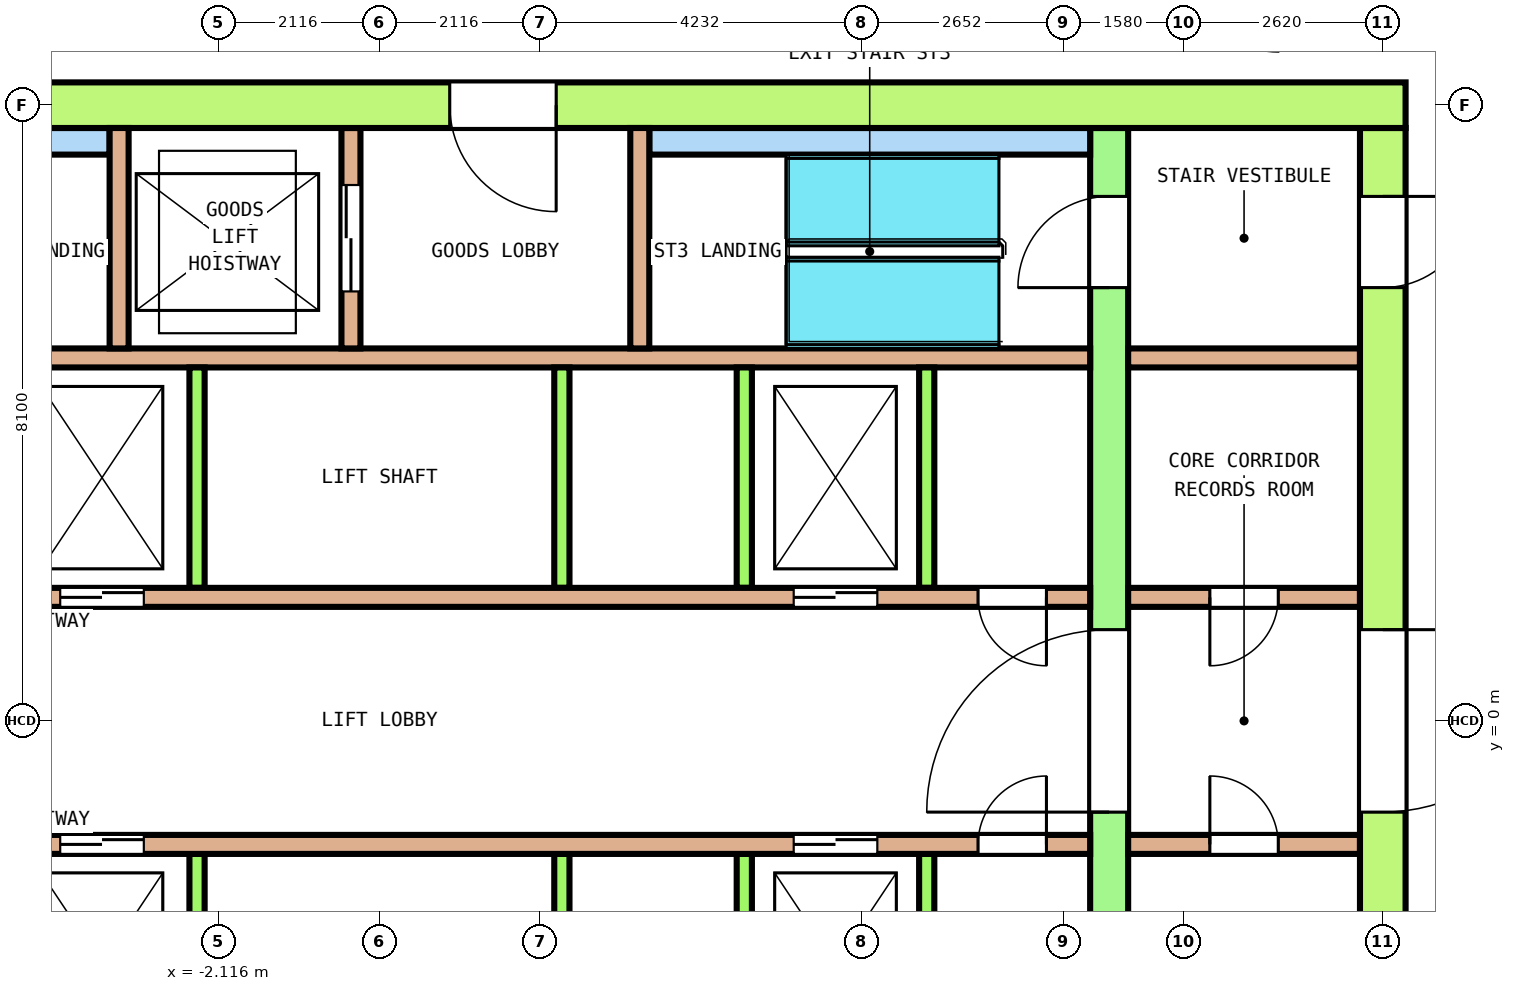
"""IFC4 building model, lengths in metres.
Left out: names, types, materials, properties, quantities, classifications, styles, units other than length and angle.
Written with IfcOpenShell. Run it as: python <this file> out.ifc"""

import sys

from ifc_helpers import new_model, si_unit, direction, frame, frame_2d, origin, place, context, subcontext, project, spatial, rectangle, extrude, element, fill, save


model = new_model("IFC4")
c1 = context("Model", 3, precision=1e-05, world=origin(), true_north=direction((0.0, 1.0)))
c2 = subcontext(c1, "Body", "Model", "MODEL_VIEW")
j1 = project(units=[si_unit("LENGTHUNIT", "METRE"), si_unit("PLANEANGLEUNIT", "RADIAN")], contexts=[c1])
p1 = place(None, origin())
s1 = spatial("IfcSite", under=j1, at=p1, CompositionType="ELEMENT")
p2 = place(p1, origin())
s2 = spatial("IfcBuilding", under=s1, at=p2, CompositionType="ELEMENT")
p3 = place(p2, frame((0.0, 0.0, 227.4)))
s3 = spatial("IfcBuildingStorey", under=s2, at=p3, CompositionType="ELEMENT", Elevation=227.4)
p4 = place(p3, frame((-13.5, 8.1, 0.0), z_axis=(0.0, 0.0, 1.0), x_axis=(1.0, 0.0, 0.0)))
e1 = element("IfcWall", 1, at=p4, inside=s3, PredefinedType="SHEAR", context=c2, shape_type="SweptSolid", body=[
    extrude(rectangle(XDim=27.0, YDim=0.6, at=frame_2d((13.5, 0.0))), origin(), (0.0, 0.0, 1.0), 3.7),
])
p5 = place(p4, frame((14.425, 0.0, 0.0)))
e2 = element("IfcOpeningElement", 2, at=p5, cuts=e1, PredefinedType="OPENING", context=c2, shape_type="SweptSolid", body=[
    extrude(rectangle(XDim=1.4, YDim=2.1, at=frame_2d((0.7, 1.05))), frame((0.0, 0.31, 0.0), z_axis=(0.0, -1.0, 0.0), x_axis=(1.0, 0.0, 0.0)), (0.0, 0.0, 1.0), 0.62),
])
p6 = place(p3, frame((13.2, -7.8, 0.0), z_axis=(0.0, 0.0, 1.0), x_axis=(0.0, 1.0, 0.0)))
e3 = element("IfcWall", 3, at=p6, inside=s3, PredefinedType="SHEAR", context=c2, shape_type="SweptSolid", body=[
    extrude(rectangle(XDim=15.6, YDim=0.6, at=frame_2d((7.8, 0.0))), origin(), (0.0, 0.0, 1.0), 3.7),
])
p7 = place(p6, frame((6.6, 0.0, 0.0)))
e4 = element("IfcOpeningElement", 4, at=p7, cuts=e3, PredefinedType="OPENING", context=c2, shape_type="SweptSolid", body=[
    extrude(rectangle(XDim=2.4, YDim=2.1, at=frame_2d((1.2, 1.05))), frame((0.0, 0.31, 0.0), z_axis=(0.0, -1.0, 0.0), x_axis=(1.0, 0.0, 0.0)), (0.0, 0.0, 1.0), 0.62),
])
p8 = place(p6, frame((13.5, 0.0, 0.0)))
e5 = element("IfcOpeningElement", 5, at=p8, cuts=e3, PredefinedType="OPENING", context=c2, shape_type="SweptSolid", body=[
    extrude(rectangle(XDim=1.2, YDim=2.1, at=frame_2d((0.6, 1.05))), frame((0.0, 0.31, 0.0), z_axis=(0.0, -1.0, 0.0), x_axis=(1.0, 0.0, 0.0)), (0.0, 0.0, 1.0), 0.62),
])
p9 = place(p6, frame((0.194, 0.0, 0.0)))
e6 = element("IfcOpeningElement", 6, at=p9, cuts=e3, PredefinedType="OPENING", context=c2, shape_type="SweptSolid", body=[
    extrude(rectangle(XDim=1.0, YDim=2.1, at=frame_2d((0.5, 1.05))), frame((0.0, 0.31, 0.0), z_axis=(0.0, -1.0, 0.0), x_axis=(1.0, 0.0, 0.0)), (0.0, 0.0, 1.0), 0.62),
])
p10 = place(p6, frame((1.706, 0.0, 0.0)))
e7 = element("IfcOpeningElement", 7, at=p10, cuts=e3, PredefinedType="OPENING", context=c2, shape_type="SweptSolid", body=[
    extrude(rectangle(XDim=1.0, YDim=2.1, at=frame_2d((0.5, 1.05))), frame((0.0, 0.31, 0.0), z_axis=(0.0, -1.0, 0.0), x_axis=(1.0, 0.0, 0.0)), (0.0, 0.0, 1.0), 0.62),
])
p11 = place(p3, frame((9.6, -7.8, 0.0), z_axis=(0.0, 0.0, 1.0), x_axis=(0.0, 1.0, 0.0)))
e8 = element("IfcWall", 8, at=p11, inside=s3, PredefinedType="SHEAR", context=c2, shape_type="SweptSolid", body=[
    extrude(rectangle(XDim=15.6, YDim=0.5, at=frame_2d((7.8, 0.0))), origin(), (0.0, 0.0, 1.0), 3.7),
])
p12 = place(p11, frame((6.6, 0.0, 0.0)))
e9 = element("IfcOpeningElement", 9, at=p12, cuts=e8, PredefinedType="OPENING", context=c2, shape_type="SweptSolid", body=[
    extrude(rectangle(XDim=2.4, YDim=2.1, at=frame_2d((1.2, 1.05))), frame((0.0, 0.26, 0.0), z_axis=(0.0, -1.0, 0.0), x_axis=(1.0, 0.0, 0.0)), (0.0, 0.0, 1.0), 0.52),
])
p13 = place(p11, frame((13.5, 0.0, 0.0)))
e10 = element("IfcOpeningElement", 10, at=p13, cuts=e8, PredefinedType="OPENING", context=c2, shape_type="SweptSolid", body=[
    extrude(rectangle(XDim=1.2, YDim=2.1, at=frame_2d((0.6, 1.05))), frame((0.0, 0.26, 0.0), z_axis=(0.0, -1.0, 0.0), x_axis=(1.0, 0.0, 0.0)), (0.0, 0.0, 1.0), 0.52),
])
p14 = place(p11, frame((1.0, 0.0, 0.0)))
e11 = element("IfcOpeningElement", 11, at=p14, cuts=e8, PredefinedType="OPENING", context=c2, shape_type="SweptSolid", body=[
    extrude(rectangle(XDim=1.0, YDim=2.1, at=frame_2d((0.5, 1.05))), frame((0.0, 0.26, 0.0), z_axis=(0.0, -1.0, 0.0), x_axis=(1.0, 0.0, 0.0)), (0.0, 0.0, 1.0), 0.52),
])
p15 = place(p3, frame((-9.35, 1.625, 0.0), z_axis=(0.0, 0.0, 1.0), x_axis=(1.0, 0.0, 0.0)))
e12 = element("IfcWall", 12, at=p15, inside=s3, PredefinedType="SOLIDWALL", context=c2, shape_type="SweptSolid", body=[
    extrude(rectangle(XDim=18.7, YDim=0.25, at=frame_2d((9.35, 0.0))), origin(), (0.0, 0.0, 1.0), 3.7),
])
p16 = place(p15, frame((2.85, 0.0, 0.0)))
e13 = element("IfcOpeningElement", 13, at=p16, cuts=e12, PredefinedType="OPENING", context=c2, shape_type="SweptSolid", body=[
    extrude(rectangle(XDim=1.1, YDim=2.1, at=frame_2d((0.55, 1.05))), frame((0.0, 0.135, 0.0), z_axis=(0.0, -1.0, 0.0), x_axis=(1.0, 0.0, 0.0)), (0.0, 0.0, 1.0), 0.27),
])
p17 = place(p15, frame((5.15, 0.0, 0.0)))
e14 = element("IfcOpeningElement", 14, at=p17, cuts=e12, PredefinedType="OPENING", context=c2, shape_type="SweptSolid", body=[
    extrude(rectangle(XDim=1.1, YDim=2.1, at=frame_2d((0.55, 1.05))), frame((0.0, 0.135, 0.0), z_axis=(0.0, -1.0, 0.0), x_axis=(1.0, 0.0, 0.0)), (0.0, 0.0, 1.0), 0.27),
])
p18 = place(p15, frame((14.8, 0.0, 0.0)))
e15 = element("IfcOpeningElement", 15, at=p18, cuts=e12, PredefinedType="OPENING", context=c2, shape_type="SweptSolid", body=[
    extrude(rectangle(XDim=1.1, YDim=2.1, at=frame_2d((0.55, 1.05))), frame((0.0, 0.135, 0.0), z_axis=(0.0, -1.0, 0.0), x_axis=(1.0, 0.0, 0.0)), (0.0, 0.0, 1.0), 0.27),
])
p19 = place(p15, frame((0.575, 0.0, 0.0)))
e16 = element("IfcOpeningElement", 16, at=p19, cuts=e12, PredefinedType="OPENING", context=c2, shape_type="SweptSolid", body=[
    extrude(rectangle(XDim=0.9, YDim=2.1, at=frame_2d((0.45, 1.05))), frame((0.0, 0.135, 0.0), z_axis=(0.0, -1.0, 0.0), x_axis=(1.0, 0.0, 0.0)), (0.0, 0.0, 1.0), 0.27),
])
p20 = place(p15, frame((17.225, 0.0, 0.0)))
e17 = element("IfcOpeningElement", 17, at=p20, cuts=e12, PredefinedType="OPENING", context=c2, shape_type="SweptSolid", body=[
    extrude(rectangle(XDim=0.9, YDim=2.1, at=frame_2d((0.45, 1.05))), frame((0.0, 0.135, 0.0), z_axis=(0.0, -1.0, 0.0), x_axis=(1.0, 0.0, 0.0)), (0.0, 0.0, 1.0), 0.27),
])
p21 = place(p3, frame((9.85, 1.625, 0.0), z_axis=(0.0, 0.0, 1.0), x_axis=(1.0, 0.0, 0.0)))
e18 = element("IfcWall", 18, at=p21, inside=s3, PredefinedType="SOLIDWALL", context=c2, shape_type="SweptSolid", body=[
    extrude(rectangle(XDim=3.05, YDim=0.25, at=frame_2d((1.525, 0.0))), origin(), (0.0, 0.0, 1.0), 3.7),
])
p22 = place(p21, frame((1.075, 0.0, 0.0)))
e19 = element("IfcOpeningElement", 19, at=p22, cuts=e18, PredefinedType="OPENING", context=c2, shape_type="SweptSolid", body=[
    extrude(rectangle(XDim=0.9, YDim=2.1, at=frame_2d((0.45, 1.05))), frame((0.0, 0.135, 0.0), z_axis=(0.0, -1.0, 0.0), x_axis=(1.0, 0.0, 0.0)), (0.0, 0.0, 1.0), 0.27),
])
p23 = place(p3, frame((-9.35, 4.775, 0.0), z_axis=(0.0, 0.0, 1.0), x_axis=(1.0, 0.0, 0.0)))
e20 = element("IfcWall", 20, at=p23, inside=s3, PredefinedType="SOLIDWALL", context=c2, shape_type="SweptSolid", body=[
    extrude(rectangle(XDim=18.7, YDim=0.25, at=frame_2d((9.35, 0.0))), origin(), (0.0, 0.0, 1.0), 3.7),
])
p24 = place(p3, frame((9.85, 4.775, 0.0), z_axis=(0.0, 0.0, 1.0), x_axis=(1.0, 0.0, 0.0)))
e21 = element("IfcWall", 21, at=p24, inside=s3, PredefinedType="SOLIDWALL", context=c2, shape_type="SweptSolid", body=[
    extrude(rectangle(XDim=3.05, YDim=0.25, at=frame_2d((1.525, 0.0))), origin(), (0.0, 0.0, 1.0), 3.7),
])
for number, where, z_axis, x_axis in (
    (22, (-2.4, 1.75, 0.0), (0.0, 0.0, 1.0), (0.0, 1.0, 0.0)),
    (23, (2.4, 1.75, 0.0), (0.0, 0.0, 1.0), (0.0, 1.0, 0.0)),
    (24, (4.8, 1.75, 0.0), (0.0, 0.0, 1.0), (0.0, 1.0, 0.0)),
    (25, (7.2, 1.75, 0.0), (0.0, 0.0, 1.0), (0.0, 1.0, 0.0)),
):
    element("IfcWall", number, at=place(p3, frame(where, z_axis=z_axis, x_axis=x_axis)), inside=s3, PredefinedType="SOLIDWALL", context=c2, shape_type="SweptSolid", body=[
        extrude(rectangle(XDim=2.9, YDim=0.2, at=frame_2d((1.45, 0.0))), origin(), (0.0, 0.0, 1.0), 3.7),
    ])
p25 = place(p3, frame((-9.35, -1.625, 0.0), z_axis=(0.0, 0.0, 1.0), x_axis=(1.0, 0.0, 0.0)))
e26 = element("IfcWall", 26, at=p25, inside=s3, PredefinedType="SOLIDWALL", context=c2, shape_type="SweptSolid", body=[
    extrude(rectangle(XDim=18.7, YDim=0.25, at=frame_2d((9.35, 0.0))), origin(), (0.0, 0.0, 1.0), 3.7),
])
p26 = place(p25, frame((2.85, 0.0, 0.0)))
e27 = element("IfcOpeningElement", 27, at=p26, cuts=e26, PredefinedType="OPENING", context=c2, shape_type="SweptSolid", body=[
    extrude(rectangle(XDim=1.1, YDim=2.1, at=frame_2d((0.55, 1.05))), frame((0.0, 0.135, 0.0), z_axis=(0.0, -1.0, 0.0), x_axis=(1.0, 0.0, 0.0)), (0.0, 0.0, 1.0), 0.27),
])
p27 = place(p25, frame((5.15, 0.0, 0.0)))
e28 = element("IfcOpeningElement", 28, at=p27, cuts=e26, PredefinedType="OPENING", context=c2, shape_type="SweptSolid", body=[
    extrude(rectangle(XDim=1.1, YDim=2.1, at=frame_2d((0.55, 1.05))), frame((0.0, 0.135, 0.0), z_axis=(0.0, -1.0, 0.0), x_axis=(1.0, 0.0, 0.0)), (0.0, 0.0, 1.0), 0.27),
])
p28 = place(p25, frame((14.8, 0.0, 0.0)))
e29 = element("IfcOpeningElement", 29, at=p28, cuts=e26, PredefinedType="OPENING", context=c2, shape_type="SweptSolid", body=[
    extrude(rectangle(XDim=1.1, YDim=2.1, at=frame_2d((0.55, 1.05))), frame((0.0, 0.135, 0.0), z_axis=(0.0, -1.0, 0.0), x_axis=(1.0, 0.0, 0.0)), (0.0, 0.0, 1.0), 0.27),
])
p29 = place(p25, frame((0.575, 0.0, 0.0)))
e30 = element("IfcOpeningElement", 30, at=p29, cuts=e26, PredefinedType="OPENING", context=c2, shape_type="SweptSolid", body=[
    extrude(rectangle(XDim=0.9, YDim=2.1, at=frame_2d((0.45, 1.05))), frame((0.0, 0.135, 0.0), z_axis=(0.0, -1.0, 0.0), x_axis=(1.0, 0.0, 0.0)), (0.0, 0.0, 1.0), 0.27),
])
p30 = place(p25, frame((17.225, 0.0, 0.0)))
e31 = element("IfcOpeningElement", 31, at=p30, cuts=e26, PredefinedType="OPENING", context=c2, shape_type="SweptSolid", body=[
    extrude(rectangle(XDim=0.9, YDim=2.1, at=frame_2d((0.45, 1.05))), frame((0.0, 0.135, 0.0), z_axis=(0.0, -1.0, 0.0), x_axis=(1.0, 0.0, 0.0)), (0.0, 0.0, 1.0), 0.27),
])
p31 = place(p3, frame((9.85, -1.625, 0.0), z_axis=(0.0, 0.0, 1.0), x_axis=(1.0, 0.0, 0.0)))
e32 = element("IfcWall", 32, at=p31, inside=s3, PredefinedType="SOLIDWALL", context=c2, shape_type="SweptSolid", body=[
    extrude(rectangle(XDim=3.05, YDim=0.25, at=frame_2d((1.525, 0.0))), origin(), (0.0, 0.0, 1.0), 3.7),
])
p32 = place(p31, frame((1.075, 0.0, 0.0)))
e33 = element("IfcOpeningElement", 33, at=p32, cuts=e32, PredefinedType="OPENING", context=c2, shape_type="SweptSolid", body=[
    extrude(rectangle(XDim=0.9, YDim=2.1, at=frame_2d((0.45, 1.05))), frame((0.0, 0.135, 0.0), z_axis=(0.0, -1.0, 0.0), x_axis=(1.0, 0.0, 0.0)), (0.0, 0.0, 1.0), 0.27),
])
for number, where, z_axis, x_axis in (
    (34, (-2.4, -4.65, 0.0), (0.0, 0.0, 1.0), (0.0, 1.0, 0.0)),
    (35, (2.4, -4.65, 0.0), (0.0, 0.0, 1.0), (0.0, 1.0, 0.0)),
    (36, (4.8, -4.65, 0.0), (0.0, 0.0, 1.0), (0.0, 1.0, 0.0)),
    (37, (7.2, -4.65, 0.0), (0.0, 0.0, 1.0), (0.0, 1.0, 0.0)),
):
    element("IfcWall", number, at=place(p3, frame(where, z_axis=z_axis, x_axis=x_axis)), inside=s3, PredefinedType="SOLIDWALL", context=c2, shape_type="SweptSolid", body=[
        extrude(rectangle(XDim=2.9, YDim=0.2, at=frame_2d((1.45, 0.0))), origin(), (0.0, 0.0, 1.0), 3.7),
    ])
for number, where, z_axis, x_axis in (
    (38, (-9.35, 7.625, 0.0), (0.0, 0.0, 1.0), (1.0, 0.0, 0.0)),
    (39, (3.55, 7.625, 0.0), (0.0, 0.0, 1.0), (1.0, 0.0, 0.0)),
):
    element("IfcWall", number, at=place(p3, frame(where, z_axis=z_axis, x_axis=x_axis)), inside=s3, PredefinedType="SOLIDWALL", context=c2, shape_type="SweptSolid", body=[
        extrude(rectangle(XDim=5.8, YDim=0.35, at=frame_2d((2.9, 0.0))), origin(), (0.0, 0.0, 1.0), 3.7),
    ])
p33 = place(p3, frame((-3.425, 4.9, 0.0), z_axis=(0.0, 0.0, 1.0), x_axis=(0.0, 1.0, 0.0)))
e40 = element("IfcWall", 40, at=p33, inside=s3, PredefinedType="SOLIDWALL", context=c2, shape_type="SweptSolid", body=[
    extrude(rectangle(XDim=2.9, YDim=0.25, at=frame_2d((1.45, 0.0))), origin(), (0.0, 0.0, 1.0), 3.7),
])
p34 = place(p3, frame((-0.375, 4.9, 0.0), z_axis=(0.0, 0.0, 1.0), x_axis=(0.0, 1.0, 0.0)))
e41 = element("IfcWall", 41, at=p34, inside=s3, PredefinedType="SOLIDWALL", context=c2, shape_type="SweptSolid", body=[
    extrude(rectangle(XDim=2.9, YDim=0.25, at=frame_2d((1.45, 0.0))), origin(), (0.0, 0.0, 1.0), 3.7),
])
p35 = place(p34, frame((0.75, 0.0, 0.0)))
e42 = element("IfcOpeningElement", 42, at=p35, cuts=e41, PredefinedType="OPENING", context=c2, shape_type="SweptSolid", body=[
    extrude(rectangle(XDim=1.4, YDim=2.1, at=frame_2d((0.7, 1.05))), frame((0.0, 0.135, 0.0), z_axis=(0.0, -1.0, 0.0), x_axis=(1.0, 0.0, 0.0)), (0.0, 0.0, 1.0), 0.27),
])
p36 = place(p3, frame((3.425, 4.9, 0.0), z_axis=(0.0, 0.0, 1.0), x_axis=(0.0, 1.0, 0.0)))
e43 = element("IfcWall", 43, at=p36, inside=s3, PredefinedType="SOLIDWALL", context=c2, shape_type="SweptSolid", body=[
    extrude(rectangle(XDim=2.9, YDim=0.25, at=frame_2d((1.45, 0.0))), origin(), (0.0, 0.0, 1.0), 3.7),
])
p37 = place(p17, origin())
e44 = element("IfcDoor", 44, at=p37, inside=s3, OperationType="DOUBLE_DOOR_SLIDING", PredefinedType="DOOR", context=c2, shape_type="SweptSolid", body=[
    extrude(rectangle(XDim=1.1, YDim=2.1, at=frame_2d((0.55, 1.05))), frame((0.0, 0.075, 0.0), z_axis=(0.0, -1.0, 0.0), x_axis=(1.0, 0.0, 0.0)), (0.0, 0.0, 1.0), 0.15),
])
fill(e14, e44)
p38 = place(p18, origin())
e45 = element("IfcDoor", 45, at=p38, inside=s3, OperationType="DOUBLE_DOOR_SLIDING", PredefinedType="DOOR", context=c2, shape_type="SweptSolid", body=[
    extrude(rectangle(XDim=1.1, YDim=2.1, at=frame_2d((0.55, 1.05))), frame((0.0, 0.075, 0.0), z_axis=(0.0, -1.0, 0.0), x_axis=(1.0, 0.0, 0.0)), (0.0, 0.0, 1.0), 0.15),
])
fill(e15, e45)
p39 = place(p27, origin())
e46 = element("IfcDoor", 46, at=p39, inside=s3, OperationType="DOUBLE_DOOR_SLIDING", PredefinedType="DOOR", context=c2, shape_type="SweptSolid", body=[
    extrude(rectangle(XDim=1.1, YDim=2.1, at=frame_2d((0.55, 1.05))), frame((0.0, 0.075, 0.0), z_axis=(0.0, -1.0, 0.0), x_axis=(1.0, 0.0, 0.0)), (0.0, 0.0, 1.0), 0.15),
])
fill(e28, e46)
p40 = place(p28, origin())
e47 = element("IfcDoor", 47, at=p40, inside=s3, OperationType="DOUBLE_DOOR_SLIDING", PredefinedType="DOOR", context=c2, shape_type="SweptSolid", body=[
    extrude(rectangle(XDim=1.1, YDim=2.1, at=frame_2d((0.55, 1.05))), frame((0.0, 0.075, 0.0), z_axis=(0.0, -1.0, 0.0), x_axis=(1.0, 0.0, 0.0)), (0.0, 0.0, 1.0), 0.15),
])
fill(e29, e47)
p41 = place(p35, origin())
e48 = element("IfcDoor", 48, at=p41, inside=s3, OperationType="DOUBLE_DOOR_SLIDING", PredefinedType="DOOR", context=c2, shape_type="SweptSolid", body=[
    extrude(rectangle(XDim=1.4, YDim=2.1, at=frame_2d((0.7, 1.05))), frame((0.0, 0.075, 0.0), z_axis=(0.0, -1.0, 0.0), x_axis=(1.0, 0.0, 0.0)), (0.0, 0.0, 1.0), 0.15),
])
fill(e42, e48)
p42 = place(p12, origin())
e49 = element("IfcDoor", 49, at=p42, inside=s3, OperationType="DOUBLE_DOOR_SINGLE_SWING", PredefinedType="DOOR", context=c2, shape_type="SweptSolid", body=[
    extrude(rectangle(XDim=2.4, YDim=2.1, at=frame_2d((1.2, 1.05))), frame((0.0, 0.2, 0.0), z_axis=(0.0, -1.0, 0.0), x_axis=(1.0, 0.0, 0.0)), (0.0, 0.0, 1.0), 0.4),
])
fill(e9, e49)
p43 = place(p7, origin())
e50 = element("IfcDoor", 50, at=p43, inside=s3, OperationType="DOUBLE_DOOR_SINGLE_SWING", PredefinedType="DOOR", context=c2, shape_type="SweptSolid", body=[
    extrude(rectangle(XDim=2.4, YDim=2.1, at=frame_2d((1.2, 1.05))), frame((0.0, 0.25, 0.0), z_axis=(0.0, -1.0, 0.0), x_axis=(1.0, 0.0, 0.0)), (0.0, 0.0, 1.0), 0.5),
])
fill(e4, e50)
p44 = place(p13, origin())
e51 = element("IfcDoor", 51, at=p44, inside=s3, OperationType="SINGLE_SWING_LEFT", PredefinedType="DOOR", context=c2, shape_type="SweptSolid", body=[
    extrude(rectangle(XDim=1.2, YDim=2.1, at=frame_2d((0.6, 1.05))), frame((0.0, 0.2, 0.0), z_axis=(0.0, -1.0, 0.0), x_axis=(1.0, 0.0, 0.0)), (0.0, 0.0, 1.0), 0.4),
])
fill(e10, e51)
p45 = place(p8, origin())
e52 = element("IfcDoor", 52, at=p45, inside=s3, OperationType="SINGLE_SWING_RIGHT", PredefinedType="DOOR", context=c2, shape_type="SweptSolid", body=[
    extrude(rectangle(XDim=1.2, YDim=2.1, at=frame_2d((0.6, 1.05))), frame((0.0, 0.25, 0.0), z_axis=(0.0, -1.0, 0.0), x_axis=(1.0, 0.0, 0.0)), (0.0, 0.0, 1.0), 0.5),
])
fill(e5, e52)
p46 = place(p5, origin())
e53 = element("IfcDoor", 53, at=p46, inside=s3, OperationType="DOUBLE_DOOR_SINGLE_SWING", PredefinedType="DOOR", context=c2, shape_type="SweptSolid", body=[
    extrude(rectangle(XDim=1.4, YDim=2.1, at=frame_2d((0.7, 1.05))), frame((0.0, 0.25, 0.0), z_axis=(0.0, -1.0, 0.0), x_axis=(1.0, 0.0, 0.0)), (0.0, 0.0, 1.0), 0.5),
])
fill(e2, e53)
p47 = place(p20, origin())
e54 = element("IfcDoor", 54, at=p47, inside=s3, OperationType="SINGLE_SWING_LEFT", PredefinedType="DOOR", context=c2, shape_type="SweptSolid", body=[
    extrude(rectangle(XDim=0.9, YDim=2.1, at=frame_2d((0.45, 1.05))), frame((0.0, 0.075, 0.0), z_axis=(0.0, -1.0, 0.0), x_axis=(1.0, 0.0, 0.0)), (0.0, 0.0, 1.0), 0.15),
])
fill(e17, e54)
p48 = place(p22, origin())
e55 = element("IfcDoor", 55, at=p48, inside=s3, OperationType="SINGLE_SWING_RIGHT", PredefinedType="DOOR", context=c2, shape_type="SweptSolid", body=[
    extrude(rectangle(XDim=0.9, YDim=2.1, at=frame_2d((0.45, 1.05))), frame((0.0, 0.075, 0.0), z_axis=(0.0, -1.0, 0.0), x_axis=(1.0, 0.0, 0.0)), (0.0, 0.0, 1.0), 0.15),
])
fill(e19, e55)
p49 = place(p30, origin())
e56 = element("IfcDoor", 56, at=p49, inside=s3, OperationType="SINGLE_SWING_RIGHT", PredefinedType="DOOR", context=c2, shape_type="SweptSolid", body=[
    extrude(rectangle(XDim=0.9, YDim=2.1, at=frame_2d((0.45, 1.05))), frame((0.0, 0.075, 0.0), z_axis=(0.0, -1.0, 0.0), x_axis=(1.0, 0.0, 0.0)), (0.0, 0.0, 1.0), 0.15),
])
fill(e31, e56)
p50 = place(p32, origin())
e57 = element("IfcDoor", 57, at=p50, inside=s3, OperationType="SINGLE_SWING_LEFT", PredefinedType="DOOR", context=c2, shape_type="SweptSolid", body=[
    extrude(rectangle(XDim=0.9, YDim=2.1, at=frame_2d((0.45, 1.05))), frame((0.0, 0.075, 0.0), z_axis=(0.0, -1.0, 0.0), x_axis=(1.0, 0.0, 0.0)), (0.0, 0.0, 1.0), 0.15),
])
fill(e33, e57)
save(model, sys.argv[1])
